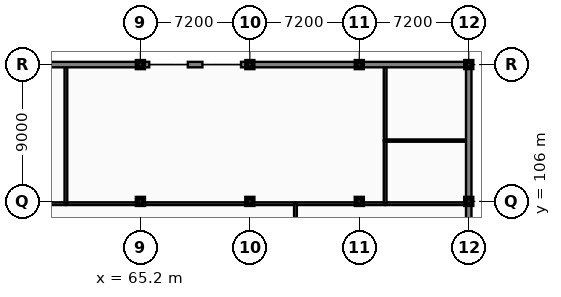
"""IFC4 building model, lengths in metres.
Left out: names, types, materials, properties, quantities, classifications, styles, units other than length and angle.
Written with IfcOpenShell. Run it as: python <this file> out.ifc"""

import sys

from ifc_helpers import new_model, si_unit, direction, frame, frame_2d, origin, origin_2d, place, context, subcontext, project, spatial, rectangle, extrude, element, fill, save


model = new_model("IFC4")
c1 = context("Model", 3, precision=1e-05, world=origin(), true_north=direction((0.0, 1.0)))
c2 = subcontext(c1, "Body", "Model", "MODEL_VIEW")
j1 = project(units=[si_unit("LENGTHUNIT", "METRE"), si_unit("PLANEANGLEUNIT", "RADIAN")], contexts=[c1])
p1 = place(None, origin())
s1 = spatial("IfcSite", under=j1, at=p1, CompositionType="ELEMENT")
p2 = place(p1, origin())
s2 = spatial("IfcBuilding", under=s1, at=p2, CompositionType="ELEMENT")
p3 = place(p2, frame((0.0, 0.0, 5.4)))
s3 = spatial("IfcBuildingStorey", under=s2, at=p3, CompositionType="ELEMENT", Elevation=5.4)
for number, where, z_axis, x_axis in (
    (1, (65.2, 106.0, 0.0), (0.0, 0.0, 1.0), (1.0, 0.0, 0.0)),
    (2, (65.2, 115.0, 0.0), (0.0, 0.0, 1.0), (1.0, 0.0, 0.0)),
    (3, (72.4, 106.0, 0.0), (0.0, 0.0, 1.0), (1.0, 0.0, 0.0)),
    (4, (72.4, 115.0, 0.0), (0.0, 0.0, 1.0), (1.0, 0.0, 0.0)),
    (5, (79.6, 106.0, 0.0), (0.0, 0.0, 1.0), (1.0, 0.0, 0.0)),
    (6, (79.6, 115.0, 0.0), (0.0, 0.0, 1.0), (1.0, 0.0, 0.0)),
    (7, (86.8, 106.0, 0.0), (0.0, 0.0, 1.0), (1.0, 0.0, 0.0)),
    (8, (86.8, 115.0, 0.0), (0.0, 0.0, 1.0), (1.0, 0.0, 0.0)),
):
    element("IfcColumn", number, at=place(p3, frame(where, z_axis=z_axis, x_axis=x_axis)), inside=s3, PredefinedType="COLUMN", context=c2, shape_type="SweptSolid", body=[
        extrude(rectangle(XDim=0.44, YDim=0.44, at=origin_2d()), origin(), (0.0, 0.0, 1.0), 4.2),
    ])
p4 = place(p3, frame((54.55, 105.85, 0.0), z_axis=(0.0, 0.0, 1.0), x_axis=(1.0, 0.0, 0.0)))
e9 = element("IfcWall", 9, at=p4, inside=s3, PredefinedType="PARTITIONING", context=c2, shape_type="SweptSolid", body=[
    extrude(rectangle(XDim=5.75, YDim=0.18, at=frame_2d((2.875, 0.0))), origin(), (0.0, 0.0, 1.0), 3.25),
])
p5 = place(p3, frame((60.3, 105.85, 0.0), z_axis=(0.0, 0.0, 1.0), x_axis=(1.0, 0.0, 0.0)))
e10 = element("IfcWall", 10, at=p5, inside=s3, PredefinedType="PARTITIONING", context=c2, shape_type="SweptSolid", body=[
    extrude(rectangle(XDim=15.1, YDim=0.18, at=frame_2d((7.55, 0.0))), origin(), (0.0, 0.0, 1.0), 3.25),
])
p6 = place(p5, frame((7.05, 0.0, -0.01)))
e11 = element("IfcOpeningElement", 11, at=p6, cuts=e10, PredefinedType="OPENING", context=c2, shape_type="SweptSolid", body=[
    extrude(rectangle(XDim=1.0, YDim=2.16, at=frame_2d((0.5, 1.08))), frame((0.0, 0.1, 0.0), z_axis=(0.0, -1.0, 0.0), x_axis=(1.0, 0.0, 0.0)), (0.0, 0.0, 1.0), 0.2),
])
p7 = place(p3, frame((75.4, 105.85, 0.0), z_axis=(0.0, 0.0, 1.0), x_axis=(1.0, 0.0, 0.0)))
e12 = element("IfcWall", 12, at=p7, inside=s3, PredefinedType="PARTITIONING", context=c2, shape_type="SweptSolid", body=[
    extrude(rectangle(XDim=5.9, YDim=0.18, at=frame_2d((2.95, 0.0))), origin(), (0.0, 0.0, 1.0), 3.25),
])
p8 = place(p3, frame((81.3, 105.85, 0.0), z_axis=(0.0, 0.0, 1.0), x_axis=(1.0, 0.0, 0.0)))
e13 = element("IfcWall", 13, at=p8, inside=s3, PredefinedType="PARTITIONING", context=c2, shape_type="SweptSolid", body=[
    extrude(rectangle(XDim=5.36, YDim=0.18, at=frame_2d((2.68, 0.0))), origin(), (0.0, 0.0, 1.0), 3.25),
])
p9 = place(p8, frame((2.18, 0.0, -0.01)))
e14 = element("IfcOpeningElement", 14, at=p9, cuts=e13, PredefinedType="OPENING", context=c2, shape_type="SweptSolid", body=[
    extrude(rectangle(XDim=1.0, YDim=2.16, at=frame_2d((0.5, 1.08))), frame((0.0, 0.1, 0.0), z_axis=(0.0, -1.0, 0.0), x_axis=(1.0, 0.0, 0.0)), (0.0, 0.0, 1.0), 0.2),
])
p10 = place(p3, frame((60.3, 105.85, 0.0), z_axis=(0.0, 0.0, 1.0), x_axis=(0.0, 1.0, 0.0)))
e15 = element("IfcWall", 15, at=p10, inside=s3, PredefinedType="PARTITIONING", context=c2, shape_type="SweptSolid", body=[
    extrude(rectangle(XDim=9.01, YDim=0.18, at=frame_2d((4.505, 0.0))), origin(), (0.0, 0.0, 1.0), 3.25),
])
p11 = place(p3, frame((81.3, 105.85, 0.0), z_axis=(0.0, 0.0, 1.0), x_axis=(0.0, 1.0, 0.0)))
e16 = element("IfcWall", 16, at=p11, inside=s3, PredefinedType="PARTITIONING", context=c2, shape_type="SweptSolid", body=[
    extrude(rectangle(XDim=4.15, YDim=0.18, at=frame_2d((2.075, 0.0))), origin(), (0.0, 0.0, 1.0), 3.25),
])
p12 = place(p11, frame((1.575, 0.0, -0.01)))
e17 = element("IfcOpeningElement", 17, at=p12, cuts=e16, PredefinedType="OPENING", context=c2, shape_type="SweptSolid", body=[
    extrude(rectangle(XDim=1.0, YDim=2.16, at=frame_2d((0.5, 1.08))), frame((0.0, 0.1, 0.0), z_axis=(0.0, -1.0, 0.0), x_axis=(1.0, 0.0, 0.0)), (0.0, 0.0, 1.0), 0.2),
])
p13 = place(p3, frame((81.3, 110.0, 0.0), z_axis=(0.0, 0.0, 1.0), x_axis=(0.0, 1.0, 0.0)))
e18 = element("IfcWall", 18, at=p13, inside=s3, PredefinedType="PARTITIONING", context=c2, shape_type="SweptSolid", body=[
    extrude(rectangle(XDim=4.86, YDim=0.18, at=frame_2d((2.43, 0.0))), origin(), (0.0, 0.0, 1.0), 3.52),
])
p14 = place(p13, frame((1.93, 0.0, -0.01)))
e19 = element("IfcOpeningElement", 19, at=p14, cuts=e18, PredefinedType="OPENING", context=c2, shape_type="SweptSolid", body=[
    extrude(rectangle(XDim=1.0, YDim=2.16, at=frame_2d((0.5, 1.08))), frame((0.0, 0.1, 0.0), z_axis=(0.0, -1.0, 0.0), x_axis=(1.0, 0.0, 0.0)), (0.0, 0.0, 1.0), 0.2),
])
p15 = place(p3, frame((81.3, 110.0, 0.0), z_axis=(0.0, 0.0, 1.0), x_axis=(1.0, 0.0, 0.0)))
e20 = element("IfcWall", 20, at=p15, inside=s3, PredefinedType="PARTITIONING", context=c2, shape_type="SweptSolid", body=[
    extrude(rectangle(XDim=5.36, YDim=0.15, at=frame_2d((2.68, 0.0))), origin(), (0.0, 0.0, 1.0), 3.52),
])
p16 = place(p3, frame((75.4, 97.5, 0.0), z_axis=(0.0, 0.0, 1.0), x_axis=(0.0, 1.0, 0.0)))
e21 = element("IfcWall", 21, at=p16, inside=s3, PredefinedType="PARTITIONING", context=c2, shape_type="SweptSolid", body=[
    extrude(rectangle(XDim=8.35, YDim=0.18, at=frame_2d((4.175, 0.0))), origin(), (0.0, 0.0, 1.0), 3.25),
])
p17 = place(p3, frame((65.2, 115.0, 0.0), z_axis=(0.0, 0.0, 1.0), x_axis=(-1.0, 0.0, 0.0)))
e22 = element("IfcWall", 22, at=p17, inside=s3, PredefinedType="SOLIDWALL", context=c2, shape_type="SweptSolid", body=[
    extrude(rectangle(XDim=7.2, YDim=0.36, at=frame_2d((3.6, 0.0))), origin(), (0.0, 0.0, 1.0), 3.37),
])
p18 = place(p17, frame((0.46, 0.0, 0.75)))
e23 = element("IfcOpeningElement", 23, at=p18, cuts=e22, PredefinedType="OPENING", context=c2, shape_type="SweptSolid", body=[
    extrude(rectangle(XDim=1.55, YDim=2.45, at=frame_2d((0.775, 1.225))), frame((0.0, 0.19, 0.0), z_axis=(0.0, -1.0, 0.0), x_axis=(1.0, 0.0, 0.0)), (0.0, 0.0, 1.0), 0.38),
])
p19 = place(p17, frame((3.06, 0.0, 0.75)))
e24 = element("IfcOpeningElement", 24, at=p19, cuts=e22, PredefinedType="OPENING", context=c2, shape_type="SweptSolid", body=[
    extrude(rectangle(XDim=1.55, YDim=2.45, at=frame_2d((0.775, 1.225))), frame((0.0, 0.19, 0.0), z_axis=(0.0, -1.0, 0.0), x_axis=(1.0, 0.0, 0.0)), (0.0, 0.0, 1.0), 0.38),
])
p20 = place(p3, frame((69.28, 115.0, 0.0), z_axis=(0.0, 0.0, 1.0), x_axis=(-1.0, 0.0, 0.0)))
e25 = element("IfcWall", 25, at=p20, inside=s3, PredefinedType="SOLIDWALL", context=c2, shape_type="SweptSolid", body=[
    extrude(rectangle(XDim=0.96, YDim=0.36, at=frame_2d((0.48, 0.0))), origin(), (0.0, 0.0, 1.0), 3.37),
])
for number, where, z_axis, x_axis in (
    (26, (72.27, 115.0, 0.0), (0.0, 0.0, 1.0), (-1.0, 0.0, 0.0)),
    (27, (65.78, 115.0, 0.0), (0.0, 0.0, 1.0), (-1.0, 0.0, 0.0)),
):
    element("IfcWall", number, at=place(p3, frame(where, z_axis=z_axis, x_axis=x_axis)), inside=s3, PredefinedType="SOLIDWALL", context=c2, shape_type="SweptSolid", body=[
        extrude(rectangle(XDim=0.45, YDim=0.36, at=frame_2d((0.225, 0.0))), origin(), (0.0, 0.0, 1.0), 3.37),
    ])
p21 = place(p3, frame((79.6, 115.0, 0.0), z_axis=(0.0, 0.0, 1.0), x_axis=(-1.0, 0.0, 0.0)))
e28 = element("IfcWall", 28, at=p21, inside=s3, PredefinedType="SOLIDWALL", context=c2, shape_type="SweptSolid", body=[
    extrude(rectangle(XDim=7.2, YDim=0.36, at=frame_2d((3.6, 0.0))), origin(), (0.0, 0.0, 1.0), 3.37),
])
p22 = place(p21, frame((0.46, 0.0, 0.75)))
e29 = element("IfcOpeningElement", 29, at=p22, cuts=e28, PredefinedType="OPENING", context=c2, shape_type="SweptSolid", body=[
    extrude(rectangle(XDim=1.55, YDim=2.45, at=frame_2d((0.775, 1.225))), frame((0.0, 0.19, 0.0), z_axis=(0.0, -1.0, 0.0), x_axis=(1.0, 0.0, 0.0)), (0.0, 0.0, 1.0), 0.38),
])
p23 = place(p21, frame((5.06, 0.0, 0.75)))
e30 = element("IfcOpeningElement", 30, at=p23, cuts=e28, PredefinedType="OPENING", context=c2, shape_type="SweptSolid", body=[
    extrude(rectangle(XDim=1.55, YDim=2.45, at=frame_2d((0.775, 1.225))), frame((0.0, 0.19, 0.0), z_axis=(0.0, -1.0, 0.0), x_axis=(1.0, 0.0, 0.0)), (0.0, 0.0, 1.0), 0.38),
])
p24 = place(p3, frame((86.8, 115.0, 0.0), z_axis=(0.0, 0.0, 1.0), x_axis=(-1.0, 0.0, 0.0)))
e31 = element("IfcWall", 31, at=p24, inside=s3, PredefinedType="SOLIDWALL", context=c2, shape_type="SweptSolid", body=[
    extrude(rectangle(XDim=7.2, YDim=0.36, at=frame_2d((3.6, 0.0))), origin(), (0.0, 0.0, 1.0), 3.37),
])
p25 = place(p24, frame((0.46, 0.0, 0.75)))
e32 = element("IfcOpeningElement", 32, at=p25, cuts=e31, PredefinedType="OPENING", context=c2, shape_type="SweptSolid", body=[
    extrude(rectangle(XDim=1.55, YDim=2.45, at=frame_2d((0.775, 1.225))), frame((0.0, 0.19, 0.0), z_axis=(0.0, -1.0, 0.0), x_axis=(1.0, 0.0, 0.0)), (0.0, 0.0, 1.0), 0.38),
])
p26 = place(p24, frame((3.66, 0.0, 0.75)))
e33 = element("IfcOpeningElement", 33, at=p26, cuts=e31, PredefinedType="OPENING", context=c2, shape_type="SweptSolid", body=[
    extrude(rectangle(XDim=1.55, YDim=2.45, at=frame_2d((0.775, 1.225))), frame((0.0, 0.19, 0.0), z_axis=(0.0, -1.0, 0.0), x_axis=(1.0, 0.0, 0.0)), (0.0, 0.0, 1.0), 0.38),
])
p27 = place(p3, frame((86.8, 97.6, 0.0), z_axis=(0.0, 0.0, 1.0), x_axis=(0.0, 1.0, 0.0)))
e34 = element("IfcWall", 34, at=p27, inside=s3, PredefinedType="SOLIDWALL", context=c2, shape_type="SweptSolid", body=[
    extrude(rectangle(XDim=8.4, YDim=0.36, at=frame_2d((4.2, 0.0))), origin(), (0.0, 0.0, 1.0), 3.25),
])
p28 = place(p27, frame((0.46, 0.0, 0.75)))
e35 = element("IfcOpeningElement", 35, at=p28, cuts=e34, PredefinedType="OPENING", context=c2, shape_type="SweptSolid", body=[
    extrude(rectangle(XDim=1.55, YDim=2.36, at=frame_2d((0.775, 1.18))), frame((0.0, 0.19, 0.0), z_axis=(0.0, -1.0, 0.0), x_axis=(1.0, 0.0, 0.0)), (0.0, 0.0, 1.0), 0.38),
])
p29 = place(p27, frame((6.26, 0.0, 0.75)))
e36 = element("IfcOpeningElement", 36, at=p29, cuts=e34, PredefinedType="OPENING", context=c2, shape_type="SweptSolid", body=[
    extrude(rectangle(XDim=1.55, YDim=2.36, at=frame_2d((0.775, 1.18))), frame((0.0, 0.19, 0.0), z_axis=(0.0, -1.0, 0.0), x_axis=(1.0, 0.0, 0.0)), (0.0, 0.0, 1.0), 0.38),
])
p30 = place(p3, frame((86.8, 106.0, 0.0), z_axis=(0.0, 0.0, 1.0), x_axis=(0.0, 1.0, 0.0)))
e37 = element("IfcWall", 37, at=p30, inside=s3, PredefinedType="SOLIDWALL", context=c2, shape_type="SweptSolid", body=[
    extrude(rectangle(XDim=9.0, YDim=0.36, at=frame_2d((4.5, 0.0))), origin(), (0.0, 0.0, 1.0), 3.25),
])
p31 = place(p30, frame((0.46, 0.0, 0.75)))
e38 = element("IfcOpeningElement", 38, at=p31, cuts=e37, PredefinedType="OPENING", context=c2, shape_type="SweptSolid", body=[
    extrude(rectangle(XDim=1.55, YDim=2.36, at=frame_2d((0.775, 1.18))), frame((0.0, 0.19, 0.0), z_axis=(0.0, -1.0, 0.0), x_axis=(1.0, 0.0, 0.0)), (0.0, 0.0, 1.0), 0.38),
])
p32 = place(p30, frame((6.86, 0.0, 0.75)))
e39 = element("IfcOpeningElement", 39, at=p32, cuts=e37, PredefinedType="OPENING", context=c2, shape_type="SweptSolid", body=[
    extrude(rectangle(XDim=1.55, YDim=2.36, at=frame_2d((0.775, 1.18))), frame((0.0, 0.19, 0.0), z_axis=(0.0, -1.0, 0.0), x_axis=(1.0, 0.0, 0.0)), (0.0, 0.0, 1.0), 0.38),
])
p33 = place(p6, frame((1.0, 0.0, 0.01), z_axis=(0.0, 0.0, 1.0), x_axis=(-1.0, 0.0, 0.0)))
e40 = element("IfcDoor", 40, at=p33, inside=s3, OperationType="SINGLE_SWING_RIGHT", PredefinedType="DOOR", context=c2, shape_type="SweptSolid", body=[
    extrude(rectangle(XDim=1.0, YDim=2.15, at=frame_2d((0.5, 1.075))), frame((0.0, 0.025, 0.0), z_axis=(0.0, -1.0, 0.0), x_axis=(1.0, 0.0, 0.0)), (0.0, 0.0, 1.0), 0.05),
])
fill(e11, e40)
p34 = place(p9, frame((0.0, 0.0, 0.01)))
e41 = element("IfcDoor", 41, at=p34, inside=s3, OperationType="SINGLE_SWING_LEFT", PredefinedType="DOOR", context=c2, shape_type="SweptSolid", body=[
    extrude(rectangle(XDim=1.0, YDim=2.15, at=frame_2d((0.5, 1.075))), frame((0.0, 0.025, 0.0), z_axis=(0.0, -1.0, 0.0), x_axis=(1.0, 0.0, 0.0)), (0.0, 0.0, 1.0), 0.05),
])
fill(e14, e41)
p35 = place(p12, frame((0.0, 0.0, 0.01)))
e42 = element("IfcDoor", 42, at=p35, inside=s3, OperationType="SINGLE_SWING_RIGHT", PredefinedType="DOOR", context=c2, shape_type="SweptSolid", body=[
    extrude(rectangle(XDim=1.0, YDim=2.15, at=frame_2d((0.5, 1.075))), frame((0.0, 0.025, 0.0), z_axis=(0.0, -1.0, 0.0), x_axis=(1.0, 0.0, 0.0)), (0.0, 0.0, 1.0), 0.05),
])
fill(e17, e42)
p36 = place(p14, frame((1.0, 0.0, 0.01), z_axis=(0.0, 0.0, 1.0), x_axis=(-1.0, 0.0, 0.0)))
e43 = element("IfcDoor", 43, at=p36, inside=s3, OperationType="SINGLE_SWING_LEFT", PredefinedType="DOOR", context=c2, shape_type="SweptSolid", body=[
    extrude(rectangle(XDim=1.0, YDim=2.15, at=frame_2d((0.5, 1.075))), frame((0.0, 0.025, 0.0), z_axis=(0.0, -1.0, 0.0), x_axis=(1.0, 0.0, 0.0)), (0.0, 0.0, 1.0), 0.05),
])
fill(e19, e43)
p37 = place(p18, origin())
e44 = element("IfcWindow", 44, at=p37, inside=s3, PartitioningType="DOUBLE_PANEL_HORIZONTAL", PredefinedType="WINDOW", context=c2, shape_type="SweptSolid", body=[
    extrude(rectangle(XDim=1.55, YDim=2.45, at=frame_2d((0.775, 1.225))), frame((0.0, 0.03, 0.0), z_axis=(0.0, -1.0, 0.0), x_axis=(1.0, 0.0, 0.0)), (0.0, 0.0, 1.0), 0.06),
])
fill(e23, e44)
p38 = place(p19, origin())
e45 = element("IfcWindow", 45, at=p38, inside=s3, PartitioningType="DOUBLE_PANEL_HORIZONTAL", PredefinedType="WINDOW", context=c2, shape_type="SweptSolid", body=[
    extrude(rectangle(XDim=1.55, YDim=2.45, at=frame_2d((0.775, 1.225))), frame((0.0, 0.03, 0.0), z_axis=(0.0, -1.0, 0.0), x_axis=(1.0, 0.0, 0.0)), (0.0, 0.0, 1.0), 0.06),
])
fill(e24, e45)
p39 = place(p22, origin())
e46 = element("IfcWindow", 46, at=p39, inside=s3, PartitioningType="DOUBLE_PANEL_HORIZONTAL", PredefinedType="WINDOW", context=c2, shape_type="SweptSolid", body=[
    extrude(rectangle(XDim=1.55, YDim=2.45, at=frame_2d((0.775, 1.225))), frame((0.0, 0.03, 0.0), z_axis=(0.0, -1.0, 0.0), x_axis=(1.0, 0.0, 0.0)), (0.0, 0.0, 1.0), 0.06),
])
fill(e29, e46)
p40 = place(p23, origin())
e47 = element("IfcWindow", 47, at=p40, inside=s3, PartitioningType="DOUBLE_PANEL_HORIZONTAL", PredefinedType="WINDOW", context=c2, shape_type="SweptSolid", body=[
    extrude(rectangle(XDim=1.55, YDim=2.45, at=frame_2d((0.775, 1.225))), frame((0.0, 0.03, 0.0), z_axis=(0.0, -1.0, 0.0), x_axis=(1.0, 0.0, 0.0)), (0.0, 0.0, 1.0), 0.06),
])
fill(e30, e47)
p41 = place(p25, origin())
e48 = element("IfcWindow", 48, at=p41, inside=s3, PartitioningType="DOUBLE_PANEL_HORIZONTAL", PredefinedType="WINDOW", context=c2, shape_type="SweptSolid", body=[
    extrude(rectangle(XDim=1.55, YDim=2.45, at=frame_2d((0.775, 1.225))), frame((0.0, 0.03, 0.0), z_axis=(0.0, -1.0, 0.0), x_axis=(1.0, 0.0, 0.0)), (0.0, 0.0, 1.0), 0.06),
])
fill(e32, e48)
p42 = place(p26, origin())
e49 = element("IfcWindow", 49, at=p42, inside=s3, PartitioningType="DOUBLE_PANEL_HORIZONTAL", PredefinedType="WINDOW", context=c2, shape_type="SweptSolid", body=[
    extrude(rectangle(XDim=1.55, YDim=2.45, at=frame_2d((0.775, 1.225))), frame((0.0, 0.03, 0.0), z_axis=(0.0, -1.0, 0.0), x_axis=(1.0, 0.0, 0.0)), (0.0, 0.0, 1.0), 0.06),
])
fill(e33, e49)
p43 = place(p29, origin())
e50 = element("IfcWindow", 50, at=p43, inside=s3, PartitioningType="DOUBLE_PANEL_HORIZONTAL", PredefinedType="WINDOW", context=c2, shape_type="SweptSolid", body=[
    extrude(rectangle(XDim=1.55, YDim=2.36, at=frame_2d((0.775, 1.18))), frame((0.0, 0.03, 0.0), z_axis=(0.0, -1.0, 0.0), x_axis=(1.0, 0.0, 0.0)), (0.0, 0.0, 1.0), 0.06),
])
fill(e36, e50)
p44 = place(p31, origin())
e51 = element("IfcWindow", 51, at=p44, inside=s3, PartitioningType="DOUBLE_PANEL_HORIZONTAL", PredefinedType="WINDOW", context=c2, shape_type="SweptSolid", body=[
    extrude(rectangle(XDim=1.55, YDim=2.36, at=frame_2d((0.775, 1.18))), frame((0.0, 0.03, 0.0), z_axis=(0.0, -1.0, 0.0), x_axis=(1.0, 0.0, 0.0)), (0.0, 0.0, 1.0), 0.06),
])
fill(e38, e51)
p45 = place(p32, origin())
e52 = element("IfcWindow", 52, at=p45, inside=s3, PartitioningType="DOUBLE_PANEL_HORIZONTAL", PredefinedType="WINDOW", context=c2, shape_type="SweptSolid", body=[
    extrude(rectangle(XDim=1.55, YDim=2.36, at=frame_2d((0.775, 1.18))), frame((0.0, 0.03, 0.0), z_axis=(0.0, -1.0, 0.0), x_axis=(1.0, 0.0, 0.0)), (0.0, 0.0, 1.0), 0.06),
])
fill(e39, e52)
save(model, sys.argv[1])
